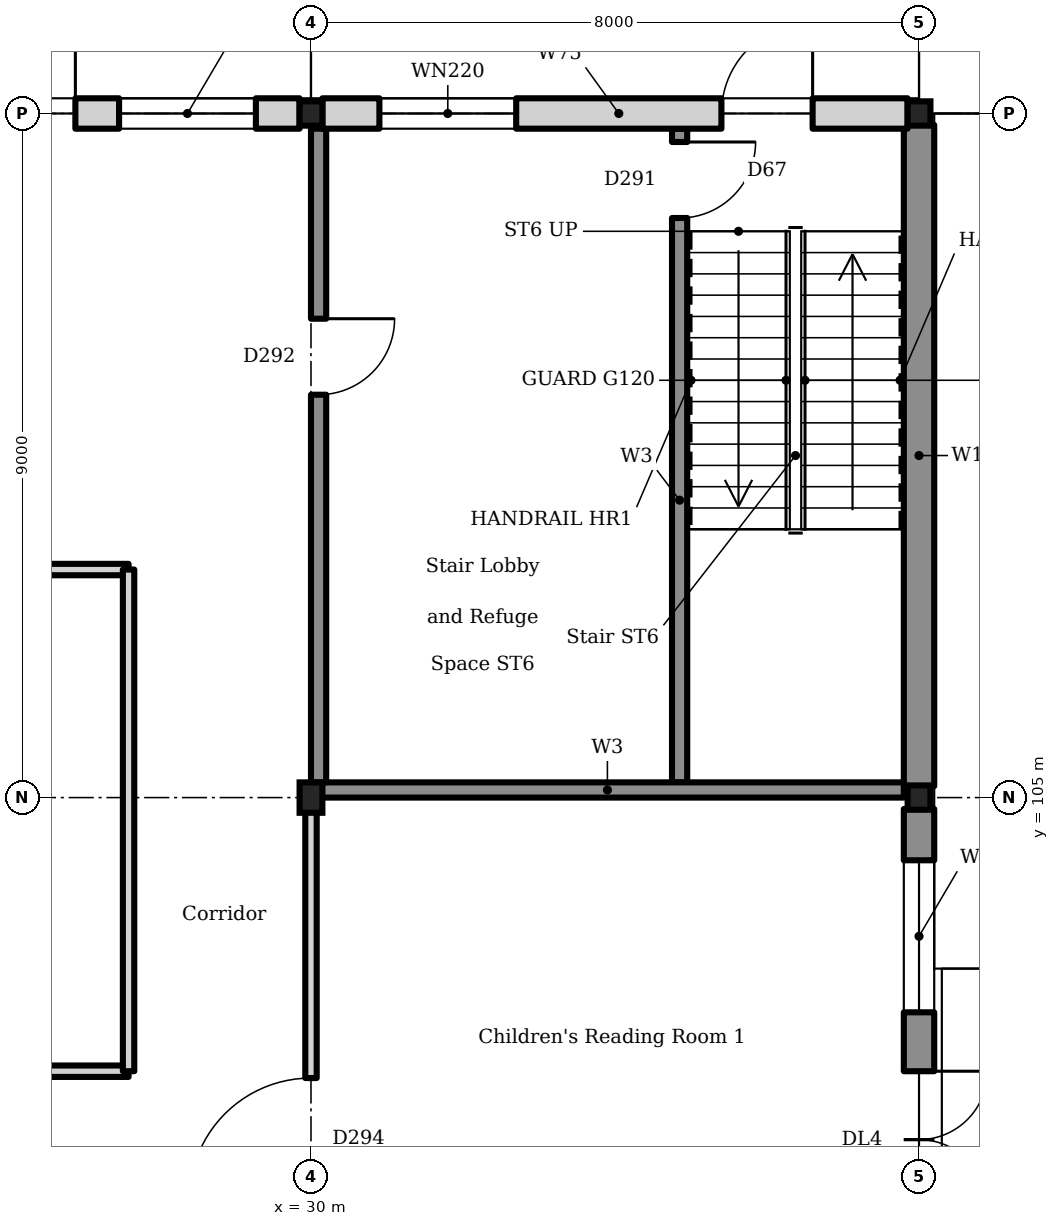
"""IFC4 building model, lengths in metres.
Left out: names, types, materials, properties, quantities, classifications, styles, units other than length and angle.
Written with IfcOpenShell. Run it as: python <this file> out.ifc"""

import sys

from ifc_helpers import new_model, si_unit, direction, frame, frame_2d, origin, origin_2d, place, context, subcontext, project, spatial, rectangle, i_section, extrude, element, fill, save


model = new_model("IFC4")
c1 = context("Model", 3, precision=1e-05, world=origin(), true_north=direction((0.0, 1.0)))
c2 = subcontext(c1, "Body", "Model", "MODEL_VIEW")
j1 = project(units=[si_unit("LENGTHUNIT", "METRE"), si_unit("PLANEANGLEUNIT", "RADIAN")], contexts=[c1])
p1 = place(None, origin())
s1 = spatial("IfcSite", under=j1, at=p1, CompositionType="ELEMENT")
p2 = place(p1, origin())
s2 = spatial("IfcBuilding", under=s1, at=p2, CompositionType="ELEMENT")
p3 = place(p2, origin())
s3 = spatial("IfcBuildingStorey", under=s2, at=p3, CompositionType="ELEMENT", Elevation=0.0)
p4 = place(p3, frame((30.0, 105.0, 0.0), z_axis=(0.0, 0.0, 1.0), x_axis=(1.0, 0.0, 0.0)))
e1 = element("IfcColumn", 1, at=p4, inside=s3, PredefinedType="COLUMN", context=c2, shape_type="SweptSolid", body=[
    extrude(i_section(OverallWidth=0.3, OverallDepth=0.4, WebThickness=0.013, FlangeThickness=0.024, FilletRadius=0.027, at=origin_2d()), origin(), (0.0, 0.0, 1.0), 5.4),
])
for number, where, z_axis, x_axis in (
    (2, (30.0, 114.0, 0.0), (0.0, 0.0, 1.0), (1.0, 0.0, 0.0)),
    (3, (38.0, 105.0, 0.0), (0.0, 0.0, 1.0), (1.0, 0.0, 0.0)),
    (4, (38.0, 114.0, 0.0), (0.0, 0.0, 1.0), (1.0, 0.0, 0.0)),
):
    element("IfcColumn", number, at=place(p3, frame(where, z_axis=z_axis, x_axis=x_axis)), inside=s3, PredefinedType="COLUMN", context=c2, shape_type="SweptSolid", body=[
        extrude(i_section(OverallWidth=0.3, OverallDepth=0.32, WebThickness=0.011, FlangeThickness=0.021, FilletRadius=0.027, at=origin_2d()), origin(), (0.0, 0.0, 1.0), 5.4),
    ])
p5 = place(p3, frame((22.15, 114.0, -0.3), z_axis=(0.0, 0.0, 1.0), x_axis=(1.0, 0.0, 0.0)))
e5 = element("IfcWall", 5, at=p5, inside=s3, PredefinedType="SOLIDWALL", context=c2, shape_type="SweptSolid", body=[
    extrude(rectangle(XDim=7.7, YDim=0.4, at=frame_2d((3.85, 0.0))), origin(), (0.0, 0.0, 1.0), 5.13),
])
p6 = place(p5, frame((0.575, 0.0, 0.45)))
e6 = element("IfcOpeningElement", 6, at=p6, cuts=e5, PredefinedType="OPENING", context=c2, shape_type="SweptSolid", body=[
    extrude(rectangle(XDim=1.8, YDim=3.6, at=frame_2d((0.9, 1.8))), frame((0.0, 0.21, 0.0), z_axis=(0.0, -1.0, 0.0), x_axis=(1.0, 0.0, 0.0)), (0.0, 0.0, 1.0), 0.42),
])
p7 = place(p5, frame((2.95, 0.0, 0.3)))
e7 = element("IfcOpeningElement", 7, at=p7, cuts=e5, PredefinedType="OPENING", context=c2, shape_type="SweptSolid", body=[
    extrude(rectangle(XDim=1.8, YDim=2.7, at=frame_2d((0.9, 1.35))), frame((0.0, 0.21, 0.0), z_axis=(0.0, -1.0, 0.0), x_axis=(1.0, 0.0, 0.0)), (0.0, 0.0, 1.0), 0.42),
])
p8 = place(p5, frame((5.325, 0.0, 0.45)))
e8 = element("IfcOpeningElement", 8, at=p8, cuts=e5, PredefinedType="OPENING", context=c2, shape_type="SweptSolid", body=[
    extrude(rectangle(XDim=1.8, YDim=3.6, at=frame_2d((0.9, 1.8))), frame((0.0, 0.21, 0.0), z_axis=(0.0, -1.0, 0.0), x_axis=(1.0, 0.0, 0.0)), (0.0, 0.0, 1.0), 0.42),
])
p9 = place(p3, frame((30.15, 114.0, -0.3), z_axis=(0.0, 0.0, 1.0), x_axis=(1.0, 0.0, 0.0)))
e9 = element("IfcWall", 9, at=p9, inside=s3, PredefinedType="SOLIDWALL", context=c2, shape_type="SweptSolid", body=[
    extrude(rectangle(XDim=7.7, YDim=0.4, at=frame_2d((3.85, 0.0))), origin(), (0.0, 0.0, 1.0), 5.13),
])
p10 = place(p9, frame((5.25, 0.0, 0.3)))
e10 = element("IfcOpeningElement", 10, at=p10, cuts=e9, PredefinedType="OPENING", context=c2, shape_type="SweptSolid", body=[
    extrude(rectangle(XDim=1.2, YDim=2.4, at=frame_2d((0.6, 1.2))), frame((0.0, 0.21, 0.0), z_axis=(0.0, -1.0, 0.0), x_axis=(1.0, 0.0, 0.0)), (0.0, 0.0, 1.0), 0.42),
])
p11 = place(p9, frame((0.75, 0.0, 0.45)))
e11 = element("IfcOpeningElement", 11, at=p11, cuts=e9, PredefinedType="OPENING", context=c2, shape_type="SweptSolid", body=[
    extrude(rectangle(XDim=1.8, YDim=3.6, at=frame_2d((0.9, 1.8))), frame((0.0, 0.21, 0.0), z_axis=(0.0, -1.0, 0.0), x_axis=(1.0, 0.0, 0.0)), (0.0, 0.0, 1.0), 0.42),
])
p12 = place(p3, frame((38.0, 96.15, -0.3), z_axis=(0.0, 0.0, 1.0), x_axis=(0.0, 1.0, 0.0)))
e12 = element("IfcWall", 12, at=p12, inside=s3, PredefinedType="SOLIDWALL", context=c2, shape_type="SweptSolid", body=[
    extrude(rectangle(XDim=8.7, YDim=0.4, at=frame_2d((4.35, 0.0))), origin(), (0.0, 0.0, 1.0), 5.7),
])
p13 = place(p12, frame((0.675, 0.0, 0.45)))
e13 = element("IfcOpeningElement", 13, at=p13, cuts=e12, PredefinedType="OPENING", context=c2, shape_type="SweptSolid", body=[
    extrude(rectangle(XDim=2.0, YDim=3.6, at=frame_2d((1.0, 1.8))), frame((0.0, 0.21, 0.0), z_axis=(0.0, -1.0, 0.0), x_axis=(1.0, 0.0, 0.0)), (0.0, 0.0, 1.0), 0.42),
])
p14 = place(p12, frame((3.45, 0.0, 0.3)))
e14 = element("IfcOpeningElement", 14, at=p14, cuts=e12, PredefinedType="OPENING", context=c2, shape_type="SweptSolid", body=[
    extrude(rectangle(XDim=1.8, YDim=2.4, at=frame_2d((0.9, 1.2))), frame((0.0, 0.21, 0.0), z_axis=(0.0, -1.0, 0.0), x_axis=(1.0, 0.0, 0.0)), (0.0, 0.0, 1.0), 0.42),
])
p15 = place(p12, frame((6.025, 0.0, 0.45)))
e15 = element("IfcOpeningElement", 15, at=p15, cuts=e12, PredefinedType="OPENING", context=c2, shape_type="SweptSolid", body=[
    extrude(rectangle(XDim=2.0, YDim=3.6, at=frame_2d((1.0, 1.8))), frame((0.0, 0.21, 0.0), z_axis=(0.0, -1.0, 0.0), x_axis=(1.0, 0.0, 0.0)), (0.0, 0.0, 1.0), 0.42),
])
p16 = place(p3, frame((38.0, 105.15, -0.3), z_axis=(0.0, 0.0, 1.0), x_axis=(0.0, 1.0, 0.0)))
e16 = element("IfcWall", 16, at=p16, inside=s3, PredefinedType="SOLIDWALL", context=c2, shape_type="SweptSolid", body=[
    extrude(rectangle(XDim=8.7, YDim=0.4, at=frame_2d((4.35, 0.0))), origin(), (0.0, 0.0, 1.0), 5.7),
])
p17 = place(p3, frame((34.85, 105.2, 0.0), z_axis=(0.0, 0.0, 1.0), x_axis=(0.0, 1.0, 0.0)))
e17 = element("IfcWall", 17, at=p17, inside=s3, PredefinedType="SOLIDWALL", context=c2, shape_type="SweptSolid", body=[
    extrude(rectangle(XDim=8.6, YDim=0.2, at=frame_2d((4.3, 0.0))), origin(), (0.0, 0.0, 1.0), 5.25),
])
p18 = place(p17, frame((7.425, 0.0, 0.0)))
e18 = element("IfcOpeningElement", 18, at=p18, cuts=e17, PredefinedType="OPENING", context=c2, shape_type="SweptSolid", body=[
    extrude(rectangle(XDim=1.0, YDim=2.1, at=frame_2d((0.5, 1.05))), frame((0.0, 0.11, 0.0), z_axis=(0.0, -1.0, 0.0), x_axis=(1.0, 0.0, 0.0)), (0.0, 0.0, 1.0), 0.22),
])
p19 = place(p3, frame((30.0, 105.1, 0.0), z_axis=(0.0, 0.0, 1.0), x_axis=(1.0, 0.0, 0.0)))
e19 = element("IfcWall", 19, at=p19, inside=s3, PredefinedType="SOLIDWALL", context=c2, shape_type="SweptSolid", body=[
    extrude(rectangle(XDim=7.8, YDim=0.2, at=frame_2d((3.9, 0.0))), origin(), (0.0, 0.0, 1.0), 5.25),
])
p20 = place(p3, frame((30.1, 105.2, 0.0), z_axis=(0.0, 0.0, 1.0), x_axis=(0.0, 1.0, 0.0)))
e20 = element("IfcWall", 20, at=p20, inside=s3, PredefinedType="SOLIDWALL", context=c2, shape_type="SweptSolid", body=[
    extrude(rectangle(XDim=8.6, YDim=0.2, at=frame_2d((4.3, 0.0))), origin(), (0.0, 0.0, 1.0), 4.81),
])
p21 = place(p20, frame((5.1, 0.0, 0.0)))
e21 = element("IfcOpeningElement", 21, at=p21, cuts=e20, PredefinedType="OPENING", context=c2, shape_type="SweptSolid", body=[
    extrude(rectangle(XDim=1.0, YDim=2.1, at=frame_2d((0.5, 1.05))), frame((0.0, 0.11, 0.0), z_axis=(0.0, -1.0, 0.0), x_axis=(1.0, 0.0, 0.0)), (0.0, 0.0, 1.0), 0.22),
])
p22 = place(p3, frame((10.4, 101.4, 0.0), z_axis=(0.0, 0.0, 1.0), x_axis=(1.0, 0.0, 0.0)))
e22 = element("IfcWall", 22, at=p22, inside=s3, PredefinedType="PARTITIONING", context=c2, shape_type="SweptSolid", body=[
    extrude(rectangle(XDim=17.2, YDim=0.15, at=frame_2d((8.6, 0.0))), origin(), (0.0, 0.0, 1.0), 4.81),
])
p23 = place(p22, frame((7.81, 0.0, 0.0)))
e23 = element("IfcOpeningElement", 23, at=p23, cuts=e22, PredefinedType="OPENING", context=c2, shape_type="SweptSolid", body=[
    extrude(rectangle(XDim=1.6, YDim=2.1, at=frame_2d((0.8, 1.05))), frame((0.0, 0.085, 0.0), z_axis=(0.0, -1.0, 0.0), x_axis=(1.0, 0.0, 0.0)), (0.0, 0.0, 1.0), 0.17),
])
p24 = place(p3, frame((14.0, 108.0, 0.0), z_axis=(0.0, 0.0, 1.0), x_axis=(1.0, 0.0, 0.0)))
e24 = element("IfcWall", 24, at=p24, inside=s3, PredefinedType="PARTITIONING", context=c2, shape_type="SweptSolid", body=[
    extrude(rectangle(XDim=13.6, YDim=0.15, at=frame_2d((6.8, 0.0))), origin(), (0.0, 0.0, 1.0), 4.81),
])
p25 = place(p3, frame((27.6, 101.4, 0.0), z_axis=(0.0, 0.0, 1.0), x_axis=(0.0, 1.0, 0.0)))
e25 = element("IfcWall", 25, at=p25, inside=s3, PredefinedType="PARTITIONING", context=c2, shape_type="SweptSolid", body=[
    extrude(rectangle(XDim=6.6, YDim=0.15, at=frame_2d((3.3, 0.0))), origin(), (0.0, 0.0, 1.0), 4.86),
])
p26 = place(p3, frame((30.0, 96.15, 0.0), z_axis=(0.0, 0.0, 1.0), x_axis=(0.0, 1.0, 0.0)))
e26 = element("IfcWall", 26, at=p26, inside=s3, PredefinedType="PARTITIONING", context=c2, shape_type="SweptSolid", body=[
    extrude(rectangle(XDim=8.7, YDim=0.15, at=frame_2d((4.35, 0.0))), origin(), (0.0, 0.0, 1.0), 4.81),
])
p27 = place(p26, frame((3.56, 0.0, 0.0)))
e27 = element("IfcOpeningElement", 27, at=p27, cuts=e26, PredefinedType="OPENING", context=c2, shape_type="SweptSolid", body=[
    extrude(rectangle(XDim=1.6, YDim=2.1, at=frame_2d((0.8, 1.05))), frame((0.0, 0.085, 0.0), z_axis=(0.0, -1.0, 0.0), x_axis=(1.0, 0.0, 0.0)), (0.0, 0.0, 1.0), 0.17),
])
p28 = place(p7, origin())
e28 = element("IfcDoor", 28, at=p28, inside=s3, OperationType="DOUBLE_DOOR_SINGLE_SWING", PredefinedType="DOOR", context=c2, shape_type="SweptSolid", body=[
    extrude(rectangle(XDim=1.8, YDim=2.7, at=frame_2d((0.9, 1.35))), frame((0.0, 0.025, 0.0), z_axis=(0.0, -1.0, 0.0), x_axis=(1.0, 0.0, 0.0)), (0.0, 0.0, 1.0), 0.05),
])
fill(e7, e28)
p29 = place(p8, origin())
e29 = element("IfcWindow", 29, at=p29, inside=s3, PartitioningType="SINGLE_PANEL", PredefinedType="WINDOW", context=c2, shape_type="SweptSolid", body=[
    extrude(rectangle(XDim=1.8, YDim=3.6, at=frame_2d((0.9, 1.8))), frame((0.0, 0.03, 0.0), z_axis=(0.0, -1.0, 0.0), x_axis=(1.0, 0.0, 0.0)), (0.0, 0.0, 1.0), 0.06),
])
fill(e8, e29)
p30 = place(p10, origin())
e30 = element("IfcDoor", 30, at=p30, inside=s3, OperationType="SINGLE_SWING_LEFT", PredefinedType="DOOR", context=c2, shape_type="SweptSolid", body=[
    extrude(rectangle(XDim=1.2, YDim=2.4, at=frame_2d((0.6, 1.2))), frame((0.0, 0.025, 0.0), z_axis=(0.0, -1.0, 0.0), x_axis=(1.0, 0.0, 0.0)), (0.0, 0.0, 1.0), 0.05),
])
fill(e10, e30)
p31 = place(p11, origin())
e31 = element("IfcWindow", 31, at=p31, inside=s3, PartitioningType="SINGLE_PANEL", PredefinedType="WINDOW", context=c2, shape_type="SweptSolid", body=[
    extrude(rectangle(XDim=1.8, YDim=3.6, at=frame_2d((0.9, 1.8))), frame((0.0, 0.03, 0.0), z_axis=(0.0, -1.0, 0.0), x_axis=(1.0, 0.0, 0.0)), (0.0, 0.0, 1.0), 0.06),
])
fill(e11, e31)
p32 = place(p14, frame((1.8, 0.0, 0.0), z_axis=(0.0, 0.0, 1.0), x_axis=(-1.0, 0.0, 0.0)))
e32 = element("IfcDoor", 32, at=p32, inside=s3, OperationType="DOUBLE_DOOR_SINGLE_SWING", PredefinedType="DOOR", context=c2, shape_type="SweptSolid", body=[
    extrude(rectangle(XDim=1.8, YDim=2.4, at=frame_2d((0.9, 1.2))), frame((0.0, 0.025, 0.0), z_axis=(0.0, -1.0, 0.0), x_axis=(1.0, 0.0, 0.0)), (0.0, 0.0, 1.0), 0.05),
])
fill(e14, e32)
p33 = place(p15, origin())
e33 = element("IfcWindow", 33, at=p33, inside=s3, PartitioningType="SINGLE_PANEL", PredefinedType="WINDOW", context=c2, shape_type="SweptSolid", body=[
    extrude(rectangle(XDim=2.0, YDim=3.6, at=frame_2d((1.0, 1.8))), frame((0.0, 0.03, 0.0), z_axis=(0.0, -1.0, 0.0), x_axis=(1.0, 0.0, 0.0)), (0.0, 0.0, 1.0), 0.06),
])
fill(e15, e33)
p34 = place(p18, frame((1.0, 0.0, 0.0), z_axis=(0.0, 0.0, 1.0), x_axis=(-1.0, 0.0, 0.0)))
e34 = element("IfcDoor", 34, at=p34, inside=s3, OperationType="SINGLE_SWING_RIGHT", PredefinedType="DOOR", context=c2, shape_type="SweptSolid", body=[
    extrude(rectangle(XDim=1.0, YDim=2.1, at=frame_2d((0.5, 1.05))), frame((0.0, 0.025, 0.0), z_axis=(0.0, -1.0, 0.0), x_axis=(1.0, 0.0, 0.0)), (0.0, 0.0, 1.0), 0.05),
])
fill(e18, e34)
p35 = place(p21, frame((1.0, 0.0, 0.0), z_axis=(0.0, 0.0, 1.0), x_axis=(-1.0, 0.0, 0.0)))
e35 = element("IfcDoor", 35, at=p35, inside=s3, OperationType="SINGLE_SWING_RIGHT", PredefinedType="DOOR", context=c2, shape_type="SweptSolid", body=[
    extrude(rectangle(XDim=1.0, YDim=2.1, at=frame_2d((0.5, 1.05))), frame((0.0, 0.025, 0.0), z_axis=(0.0, -1.0, 0.0), x_axis=(1.0, 0.0, 0.0)), (0.0, 0.0, 1.0), 0.05),
])
fill(e21, e35)
p36 = place(p27, origin())
e36 = element("IfcDoor", 36, at=p36, inside=s3, OperationType="DOUBLE_DOOR_SINGLE_SWING", PredefinedType="DOOR", context=c2, shape_type="SweptSolid", body=[
    extrude(rectangle(XDim=1.6, YDim=2.1, at=frame_2d((0.8, 1.05))), frame((0.0, 0.025, 0.0), z_axis=(0.0, -1.0, 0.0), x_axis=(1.0, 0.0, 0.0)), (0.0, 0.0, 1.0), 0.05),
])
fill(e27, e36)
save(model, sys.argv[1])
